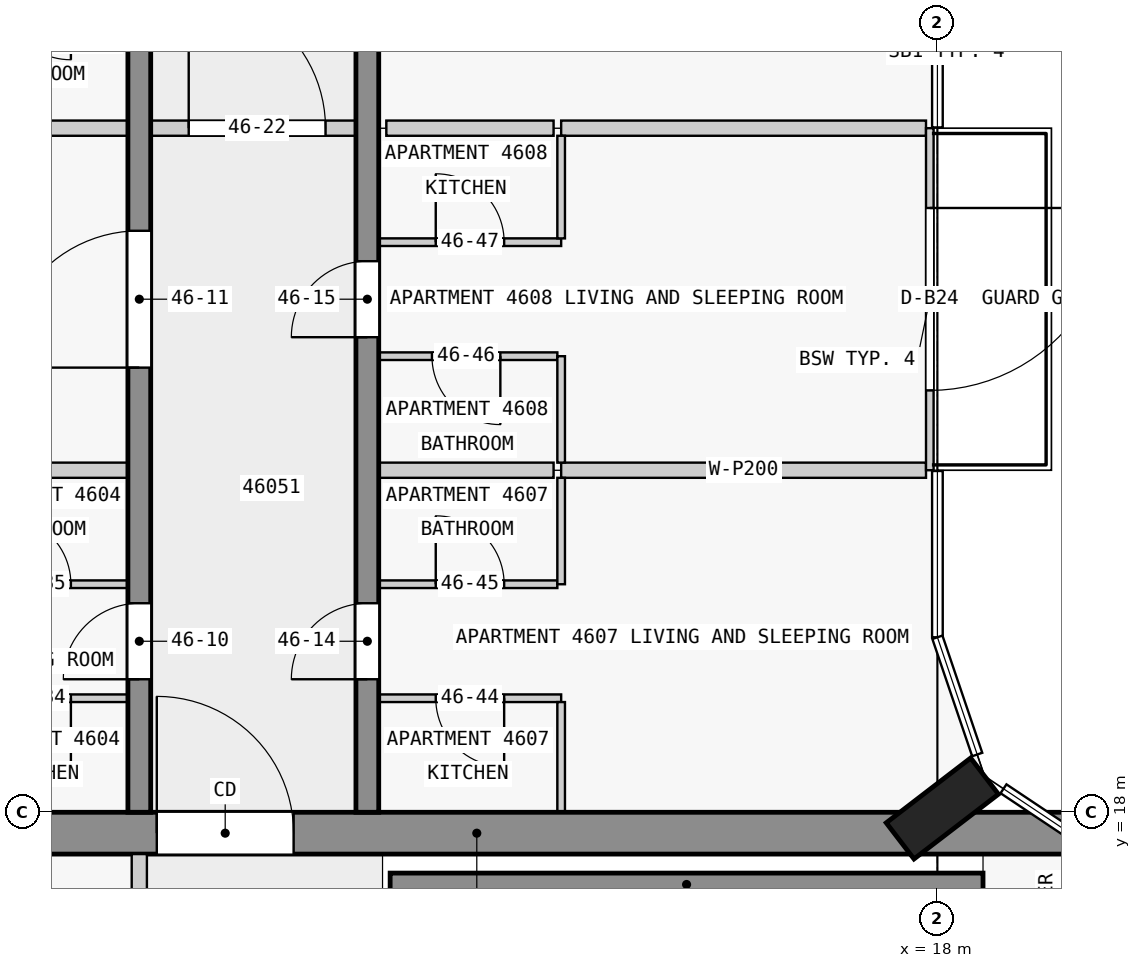
"""IFC4 building model, lengths in metres.
Left out: names, types, materials, properties, quantities, classifications, styles, units other than length and angle.
Written with IfcOpenShell. Run it as: python <this file> out.ifc"""

import sys

from ifc_helpers import new_model, si_unit, direction, frame, frame_2d, origin, origin_2d, place, context, subcontext, project, spatial, rectangle, extrude, element, fill, save


model = new_model("IFC4")
c1 = context("Model", 3, precision=1e-05, world=origin(), true_north=direction((0.0, 1.0)))
c2 = subcontext(c1, "Body", "Model", "MODEL_VIEW")
j1 = project(units=[si_unit("LENGTHUNIT", "METRE"), si_unit("PLANEANGLEUNIT", "RADIAN")], contexts=[c1])
p1 = place(None, origin())
s1 = spatial("IfcSite", under=j1, at=p1, CompositionType="ELEMENT")
p2 = place(p1, origin())
s2 = spatial("IfcBuilding", under=s1, at=p2, CompositionType="ELEMENT")
p3 = place(p2, frame((0.0, 0.0, 177.9)))
s3 = spatial("IfcBuildingStorey", under=s2, at=p3, CompositionType="ELEMENT", Elevation=177.9)
p4 = place(p3, frame((18.065, 18.05, 0.0), z_axis=(0.0, 0.0, 1.0), x_axis=(-0.608810846443, 0.793315418515, 0.0)))
e1 = element("IfcColumn", 1, at=p4, inside=s3, PredefinedType="COLUMN", context=c2, shape_type="SweptSolid", body=[
    extrude(rectangle(XDim=0.6, YDim=1.4, at=origin_2d()), origin(), (0.0, 0.0, 1.0), 3.5),
])
p5 = place(p3, frame((1.38, 17.725, 0.0), z_axis=(0.0, 0.0, 1.0), x_axis=(1.0, 0.0, 0.0)))
e2 = element("IfcWall", 2, at=p5, inside=s3, PredefinedType="SHEAR", context=c2, shape_type="SweptSolid", body=[
    extrude(rectangle(XDim=21.12, YDim=0.55, at=frame_2d((10.56, 0.0))), origin(), (0.0, 0.0, 1.0), 3.25),
])
p6 = place(p5, frame((6.35, 0.0, 0.0)))
e3 = element("IfcOpeningElement", 3, at=p6, cuts=e2, PredefinedType="OPENING", context=c2, shape_type="SweptSolid", body=[
    extrude(rectangle(XDim=1.8, YDim=2.1, at=frame_2d((0.9, 1.05))), frame((0.0, 0.285, 0.0), z_axis=(0.0, -1.0, 0.0), x_axis=(1.0, 0.0, 0.0)), (0.0, 0.0, 1.0), 0.57),
])
p7 = place(p3, frame((10.8, 17.05, 0.0), z_axis=(0.0, 0.0, 1.0), x_axis=(1.0, 0.0, 0.0)))
e4 = element("IfcWall", 4, at=p7, inside=s3, PredefinedType="SHEAR", context=c2, shape_type="SweptSolid", body=[
    extrude(rectangle(XDim=7.8, YDim=0.3, at=frame_2d((3.9, 0.0))), origin(), (0.0, 0.0, 1.0), 3.25),
])
p8 = place(p3, frame((7.5, 18.0, 0.0), z_axis=(0.0, 0.0, 1.0), x_axis=(0.0, 1.0, 0.0)))
e5 = element("IfcWall", 5, at=p8, inside=s3, PredefinedType="SHEAR", context=c2, shape_type="SweptSolid", body=[
    extrude(rectangle(XDim=27.0, YDim=0.3, at=frame_2d((13.5, 0.0))), origin(), (0.0, 0.0, 1.0), 3.25),
])
p9 = place(p8, frame((1.75, 0.0, 0.0)))
e6 = element("IfcOpeningElement", 6, at=p9, cuts=e5, PredefinedType="OPENING", context=c2, shape_type="SweptSolid", body=[
    extrude(rectangle(XDim=1.0, YDim=2.1, at=frame_2d((0.5, 1.05))), frame((0.0, 0.16, 0.0), z_axis=(0.0, -1.0, 0.0), x_axis=(1.0, 0.0, 0.0)), (0.0, 0.0, 1.0), 0.32),
])
p10 = place(p8, frame((5.85, 0.0, 0.0)))
e7 = element("IfcOpeningElement", 7, at=p10, cuts=e5, PredefinedType="OPENING", context=c2, shape_type="SweptSolid", body=[
    extrude(rectangle(XDim=1.8, YDim=2.1, at=frame_2d((0.9, 1.05))), frame((0.0, 0.16, 0.0), z_axis=(0.0, -1.0, 0.0), x_axis=(1.0, 0.0, 0.0)), (0.0, 0.0, 1.0), 0.32),
])
p11 = place(p8, frame((13.05, 0.0, 0.0)))
e8 = element("IfcOpeningElement", 8, at=p11, cuts=e5, PredefinedType="OPENING", context=c2, shape_type="SweptSolid", body=[
    extrude(rectangle(XDim=1.0, YDim=2.1, at=frame_2d((0.5, 1.05))), frame((0.0, 0.16, 0.0), z_axis=(0.0, -1.0, 0.0), x_axis=(1.0, 0.0, 0.0)), (0.0, 0.0, 1.0), 0.32),
])
p12 = place(p8, frame((21.35, 0.0, 0.0)))
e9 = element("IfcOpeningElement", 9, at=p12, cuts=e5, PredefinedType="OPENING", context=c2, shape_type="SweptSolid", body=[
    extrude(rectangle(XDim=1.0, YDim=2.1, at=frame_2d((0.5, 1.05))), frame((0.0, 0.16, 0.0), z_axis=(0.0, -1.0, 0.0), x_axis=(1.0, 0.0, 0.0)), (0.0, 0.0, 1.0), 0.32),
])
p13 = place(p3, frame((10.5, 18.0, 0.0), z_axis=(0.0, 0.0, 1.0), x_axis=(0.0, 1.0, 0.0)))
e10 = element("IfcWall", 10, at=p13, inside=s3, PredefinedType="SHEAR", context=c2, shape_type="SweptSolid", body=[
    extrude(rectangle(XDim=27.0, YDim=0.3, at=frame_2d((13.5, 0.0))), origin(), (0.0, 0.0, 1.0), 3.25),
])
p14 = place(p13, frame((1.75, 0.0, 0.0)))
e11 = element("IfcOpeningElement", 11, at=p14, cuts=e10, PredefinedType="OPENING", context=c2, shape_type="SweptSolid", body=[
    extrude(rectangle(XDim=1.0, YDim=2.1, at=frame_2d((0.5, 1.05))), frame((0.0, 0.16, 0.0), z_axis=(0.0, -1.0, 0.0), x_axis=(1.0, 0.0, 0.0)), (0.0, 0.0, 1.0), 0.32),
])
p15 = place(p13, frame((6.25, 0.0, 0.0)))
e12 = element("IfcOpeningElement", 12, at=p15, cuts=e10, PredefinedType="OPENING", context=c2, shape_type="SweptSolid", body=[
    extrude(rectangle(XDim=1.0, YDim=2.1, at=frame_2d((0.5, 1.05))), frame((0.0, 0.16, 0.0), z_axis=(0.0, -1.0, 0.0), x_axis=(1.0, 0.0, 0.0)), (0.0, 0.0, 1.0), 0.32),
])
p16 = place(p13, frame((10.75, 0.0, 0.0)))
e13 = element("IfcOpeningElement", 13, at=p16, cuts=e10, PredefinedType="OPENING", context=c2, shape_type="SweptSolid", body=[
    extrude(rectangle(XDim=1.0, YDim=2.1, at=frame_2d((0.5, 1.05))), frame((0.0, 0.16, 0.0), z_axis=(0.0, -1.0, 0.0), x_axis=(1.0, 0.0, 0.0)), (0.0, 0.0, 1.0), 0.32),
])
p17 = place(p13, frame((15.25, 0.0, 0.0)))
e14 = element("IfcOpeningElement", 14, at=p17, cuts=e10, PredefinedType="OPENING", context=c2, shape_type="SweptSolid", body=[
    extrude(rectangle(XDim=1.0, YDim=2.1, at=frame_2d((0.5, 1.05))), frame((0.0, 0.16, 0.0), z_axis=(0.0, -1.0, 0.0), x_axis=(1.0, 0.0, 0.0)), (0.0, 0.0, 1.0), 0.32),
])
p18 = place(p13, frame((19.75, 0.0, 0.0)))
e15 = element("IfcOpeningElement", 15, at=p18, cuts=e10, PredefinedType="OPENING", context=c2, shape_type="SweptSolid", body=[
    extrude(rectangle(XDim=1.0, YDim=2.1, at=frame_2d((0.5, 1.05))), frame((0.0, 0.16, 0.0), z_axis=(0.0, -1.0, 0.0), x_axis=(1.0, 0.0, 0.0)), (0.0, 0.0, 1.0), 0.32),
])
p19 = place(p13, frame((23.25, 0.0, 0.0)))
e16 = element("IfcOpeningElement", 16, at=p19, cuts=e10, PredefinedType="OPENING", context=c2, shape_type="SweptSolid", body=[
    extrude(rectangle(XDim=0.9, YDim=2.1, at=frame_2d((0.45, 1.05))), frame((0.0, 0.16, 0.0), z_axis=(0.0, -1.0, 0.0), x_axis=(1.0, 0.0, 0.0)), (0.0, 0.0, 1.0), 0.32),
])
p20 = place(p13, frame((25.45, 0.0, 0.0)))
e17 = element("IfcOpeningElement", 17, at=p20, cuts=e10, PredefinedType="OPENING", context=c2, shape_type="SweptSolid", body=[
    extrude(rectangle(XDim=1.0, YDim=2.1, at=frame_2d((0.5, 1.05))), frame((0.0, 0.16, 0.0), z_axis=(0.0, -1.0, 0.0), x_axis=(1.0, 0.0, 0.0)), (0.0, 0.0, 1.0), 0.32),
])
p21 = place(p3, frame((17.9, 27.0, 0.0), z_axis=(0.0, 0.0, 1.0), x_axis=(0.0, -1.0, 0.0)))
e18 = element("IfcWall", 18, at=p21, inside=s3, PredefinedType="STANDARD", context=c2, shape_type="SweptSolid", body=[
    extrude(rectangle(XDim=4.5, YDim=0.1, at=frame_2d((2.25, 0.0))), origin(), (0.0, 0.0, 1.0), 3.25),
])
p22 = place(p21, frame((1.05, 0.0, 0.0)))
e19 = element("IfcOpeningElement", 19, at=p22, cuts=e18, PredefinedType="OPENING", context=c2, shape_type="SweptSolid", body=[
    extrude(rectangle(XDim=2.4, YDim=2.4, at=frame_2d((1.2, 1.2))), frame((0.0, 0.06, 0.0), z_axis=(0.0, -1.0, 0.0), x_axis=(1.0, 0.0, 0.0)), (0.0, 0.0, 1.0), 0.12),
])
p23 = place(p3, frame((7.5, 10.1, 0.0), z_axis=(0.0, 0.0, 1.0), x_axis=(0.0, 1.0, 0.0)))
e20 = element("IfcWall", 20, at=p23, inside=s3, PredefinedType="PARTITIONING", context=c2, shape_type="SweptSolid", body=[
    extrude(rectangle(XDim=7.35, YDim=0.2, at=frame_2d((3.675, 0.0))), origin(), (0.0, 0.0, 1.0), 3.25),
])
p24 = place(p23, frame((0.775, 0.0, 0.0)))
e21 = element("IfcOpeningElement", 21, at=p24, cuts=e20, PredefinedType="OPENING", context=c2, shape_type="SweptSolid", body=[
    extrude(rectangle(XDim=0.9, YDim=2.1, at=frame_2d((0.45, 1.05))), frame((0.0, 0.11, 0.0), z_axis=(0.0, -1.0, 0.0), x_axis=(1.0, 0.0, 0.0)), (0.0, 0.0, 1.0), 0.22),
])
p25 = place(p23, frame((3.225, 0.0, 0.0)))
e22 = element("IfcOpeningElement", 22, at=p25, cuts=e20, PredefinedType="OPENING", context=c2, shape_type="SweptSolid", body=[
    extrude(rectangle(XDim=0.9, YDim=2.1, at=frame_2d((0.45, 1.05))), frame((0.0, 0.11, 0.0), z_axis=(0.0, -1.0, 0.0), x_axis=(1.0, 0.0, 0.0)), (0.0, 0.0, 1.0), 0.22),
])
p26 = place(p23, frame((5.25, 0.0, 0.0)))
e23 = element("IfcOpeningElement", 23, at=p26, cuts=e20, PredefinedType="OPENING", context=c2, shape_type="SweptSolid", body=[
    extrude(rectangle(XDim=0.9, YDim=2.1, at=frame_2d((0.45, 1.05))), frame((0.0, 0.11, 0.0), z_axis=(0.0, -1.0, 0.0), x_axis=(1.0, 0.0, 0.0)), (0.0, 0.0, 1.0), 0.22),
])
p27 = place(p3, frame((7.35, 19.5, 0.0), z_axis=(0.0, 0.0, 1.0), x_axis=(-1.0, 0.0, 0.0)))
e24 = element("IfcWall", 24, at=p27, inside=s3, PredefinedType="PARTITIONING", context=c2, shape_type="SweptSolid", body=[
    extrude(rectangle(XDim=2.4, YDim=0.1, at=frame_2d((1.2, 0.0))), origin(), (0.0, 0.0, 1.0), 3.25),
])
p28 = place(p27, frame((0.75, 0.0, 0.0)))
e25 = element("IfcOpeningElement", 25, at=p28, cuts=e24, PredefinedType="OPENING", context=c2, shape_type="SweptSolid", body=[
    extrude(rectangle(XDim=0.9, YDim=2.1, at=frame_2d((0.45, 1.05))), frame((0.0, 0.06, 0.0), z_axis=(0.0, -1.0, 0.0), x_axis=(1.0, 0.0, 0.0)), (0.0, 0.0, 1.0), 0.12),
])
p29 = place(p3, frame((13.05, 19.5, 0.0), z_axis=(0.0, 0.0, 1.0), x_axis=(-1.0, 0.0, 0.0)))
e26 = element("IfcWall", 26, at=p29, inside=s3, PredefinedType="PARTITIONING", context=c2, shape_type="SweptSolid", body=[
    extrude(rectangle(XDim=2.4, YDim=0.1, at=frame_2d((1.2, 0.0))), origin(), (0.0, 0.0, 1.0), 3.25),
])
p30 = place(p29, frame((0.75, 0.0, 0.0)))
e27 = element("IfcOpeningElement", 27, at=p30, cuts=e26, PredefinedType="OPENING", context=c2, shape_type="SweptSolid", body=[
    extrude(rectangle(XDim=0.9, YDim=2.1, at=frame_2d((0.45, 1.05))), frame((0.0, 0.06, 0.0), z_axis=(0.0, -1.0, 0.0), x_axis=(1.0, 0.0, 0.0)), (0.0, 0.0, 1.0), 0.12),
])
p31 = place(p3, frame((4.95, 21.0, 0.0), z_axis=(0.0, 0.0, 1.0), x_axis=(1.0, 0.0, 0.0)))
e28 = element("IfcWall", 28, at=p31, inside=s3, PredefinedType="PARTITIONING", context=c2, shape_type="SweptSolid", body=[
    extrude(rectangle(XDim=2.4, YDim=0.1, at=frame_2d((1.2, 0.0))), origin(), (0.0, 0.0, 1.0), 3.25),
])
p32 = place(p31, frame((0.75, 0.0, 0.0)))
e29 = element("IfcOpeningElement", 29, at=p32, cuts=e28, PredefinedType="OPENING", context=c2, shape_type="SweptSolid", body=[
    extrude(rectangle(XDim=0.9, YDim=2.1, at=frame_2d((0.45, 1.05))), frame((0.0, 0.06, 0.0), z_axis=(0.0, -1.0, 0.0), x_axis=(1.0, 0.0, 0.0)), (0.0, 0.0, 1.0), 0.12),
])
p33 = place(p3, frame((10.65, 21.0, 0.0), z_axis=(0.0, 0.0, 1.0), x_axis=(1.0, 0.0, 0.0)))
e30 = element("IfcWall", 30, at=p33, inside=s3, PredefinedType="PARTITIONING", context=c2, shape_type="SweptSolid", body=[
    extrude(rectangle(XDim=2.35, YDim=0.1, at=frame_2d((1.175, 0.0))), origin(), (0.0, 0.0, 1.0), 3.25),
])
p34 = place(p33, frame((0.75, 0.0, 0.0)))
e31 = element("IfcOpeningElement", 31, at=p34, cuts=e30, PredefinedType="OPENING", context=c2, shape_type="SweptSolid", body=[
    extrude(rectangle(XDim=0.9, YDim=2.1, at=frame_2d((0.45, 1.05))), frame((0.0, 0.06, 0.0), z_axis=(0.0, -1.0, 0.0), x_axis=(1.0, 0.0, 0.0)), (0.0, 0.0, 1.0), 0.12),
])
for number, where, z_axis, x_axis in (
    (32, (7.35, 22.5, 0.0), (0.0, 0.0, 1.0), (-1.0, 0.0, 0.0)),
    (33, (12.95, 22.5, 0.0), (0.0, 0.0, 1.0), (-1.0, 0.0, 0.0)),
):
    element("IfcWall", number, at=place(p3, frame(where, z_axis=z_axis, x_axis=x_axis)), inside=s3, PredefinedType="PARTITIONING", context=c2, shape_type="SweptSolid", body=[
        extrude(rectangle(XDim=2.3, YDim=0.2, at=frame_2d((1.15, 0.0))), origin(), (0.0, 0.0, 1.0), 3.25),
    ])
p35 = place(p3, frame((13.05, 22.5, 0.0), z_axis=(0.0, 0.0, 1.0), x_axis=(1.0, 0.0, 0.0)))
e34 = element("IfcWall", 34, at=p35, inside=s3, PredefinedType="PARTITIONING", context=c2, shape_type="SweptSolid", body=[
    extrude(rectangle(XDim=4.8, YDim=0.2, at=frame_2d((2.4, 0.0))), origin(), (0.0, 0.0, 1.0), 3.25),
])
p36 = place(p3, frame((13.0, 24.0, 0.0), z_axis=(0.0, 0.0, 1.0), x_axis=(-1.0, 0.0, 0.0)))
e35 = element("IfcWall", 35, at=p36, inside=s3, PredefinedType="PARTITIONING", context=c2, shape_type="SweptSolid", body=[
    extrude(rectangle(XDim=2.35, YDim=0.1, at=frame_2d((1.175, 0.0))), origin(), (0.0, 0.0, 1.0), 3.25),
])
p37 = place(p36, frame((0.75, 0.0, 0.0)))
e36 = element("IfcOpeningElement", 36, at=p37, cuts=e35, PredefinedType="OPENING", context=c2, shape_type="SweptSolid", body=[
    extrude(rectangle(XDim=0.9, YDim=2.1, at=frame_2d((0.45, 1.05))), frame((0.0, 0.06, 0.0), z_axis=(0.0, -1.0, 0.0), x_axis=(1.0, 0.0, 0.0)), (0.0, 0.0, 1.0), 0.12),
])
p38 = place(p3, frame((10.65, 25.5, 0.0), z_axis=(0.0, 0.0, 1.0), x_axis=(1.0, 0.0, 0.0)))
e37 = element("IfcWall", 37, at=p38, inside=s3, PredefinedType="PARTITIONING", context=c2, shape_type="SweptSolid", body=[
    extrude(rectangle(XDim=2.4, YDim=0.1, at=frame_2d((1.2, 0.0))), origin(), (0.0, 0.0, 1.0), 3.25),
])
p39 = place(p38, frame((0.75, 0.0, 0.0)))
e38 = element("IfcOpeningElement", 38, at=p39, cuts=e37, PredefinedType="OPENING", context=c2, shape_type="SweptSolid", body=[
    extrude(rectangle(XDim=0.9, YDim=2.1, at=frame_2d((0.45, 1.05))), frame((0.0, 0.06, 0.0), z_axis=(0.0, -1.0, 0.0), x_axis=(1.0, 0.0, 0.0)), (0.0, 0.0, 1.0), 0.12),
])
p40 = place(p3, frame((7.35, 27.0, 0.0), z_axis=(0.0, 0.0, 1.0), x_axis=(-1.0, 0.0, 0.0)))
e39 = element("IfcWall", 39, at=p40, inside=s3, PredefinedType="PARTITIONING", context=c2, shape_type="SweptSolid", body=[
    extrude(rectangle(XDim=7.43, YDim=0.2, at=frame_2d((3.715, 0.0))), origin(), (0.0, 0.0, 1.0), 3.25),
])
p41 = place(p3, frame((12.95, 27.0, 0.0), z_axis=(0.0, 0.0, 1.0), x_axis=(-1.0, 0.0, 0.0)))
e40 = element("IfcWall", 40, at=p41, inside=s3, PredefinedType="PARTITIONING", context=c2, shape_type="SweptSolid", body=[
    extrude(rectangle(XDim=2.2, YDim=0.2, at=frame_2d((1.1, 0.0))), origin(), (0.0, 0.0, 1.0), 3.25),
])
p42 = place(p3, frame((13.05, 27.0, 0.0), z_axis=(0.0, 0.0, 1.0), x_axis=(1.0, 0.0, 0.0)))
e41 = element("IfcWall", 41, at=p42, inside=s3, PredefinedType="PARTITIONING", context=c2, shape_type="SweptSolid", body=[
    extrude(rectangle(XDim=4.8, YDim=0.2, at=frame_2d((2.4, 0.0))), origin(), (0.0, 0.0, 1.0), 3.25),
])
p43 = place(p3, frame((13.05, 18.0, 0.0), z_axis=(0.0, 0.0, 1.0), x_axis=(0.0, 1.0, 0.0)))
e42 = element("IfcWall", 42, at=p43, inside=s3, PredefinedType="PARTITIONING", context=c2, shape_type="SweptSolid", body=[
    extrude(rectangle(XDim=1.45, YDim=0.1, at=frame_2d((0.725, 0.0))), origin(), (0.0, 0.0, 1.0), 3.25),
])
for number, where, z_axis, x_axis in (
    (43, (13.05, 21.0, 0.0), (0.0, 0.0, 1.0), (0.0, 1.0, 0.0)),
    (44, (13.05, 22.6, 0.0), (0.0, 0.0, 1.0), (0.0, 1.0, 0.0)),
):
    element("IfcWall", number, at=place(p3, frame(where, z_axis=z_axis, x_axis=x_axis)), inside=s3, PredefinedType="PARTITIONING", context=c2, shape_type="SweptSolid", body=[
        extrude(rectangle(XDim=1.4, YDim=0.1, at=frame_2d((0.7, 0.0))), origin(), (0.0, 0.0, 1.0), 3.25),
    ])
p44 = place(p3, frame((13.05, 25.55, 0.0), z_axis=(0.0, 0.0, 1.0), x_axis=(0.0, 1.0, 0.0)))
e45 = element("IfcWall", 45, at=p44, inside=s3, PredefinedType="PARTITIONING", context=c2, shape_type="SweptSolid", body=[
    extrude(rectangle(XDim=1.35, YDim=0.1, at=frame_2d((0.675, 0.0))), origin(), (0.0, 0.0, 1.0), 3.25),
])
p45 = place(p3, frame((7.45, 27.0, 0.0), z_axis=(0.0, 0.0, 1.0), x_axis=(1.0, 0.0, 0.0)))
e46 = element("IfcWall", 46, at=p45, inside=s3, PredefinedType="PARTITIONING", context=c2, shape_type="SweptSolid", body=[
    extrude(rectangle(XDim=3.2, YDim=0.2, at=frame_2d((1.6, 0.0))), origin(), (0.0, 0.0, 1.0), 3.25),
])
p46 = place(p45, frame((0.7, 0.0, 0.0)))
e47 = element("IfcOpeningElement", 47, at=p46, cuts=e46, PredefinedType="OPENING", context=c2, shape_type="SweptSolid", body=[
    extrude(rectangle(XDim=1.8, YDim=2.1, at=frame_2d((0.9, 1.05))), frame((0.0, 0.11, 0.0), z_axis=(0.0, -1.0, 0.0), x_axis=(1.0, 0.0, 0.0)), (0.0, 0.0, 1.0), 0.22),
])
p47 = place(p22, origin())
e48 = element("IfcDoor", 48, at=p47, inside=s3, OperationType="SINGLE_SWING_LEFT", PredefinedType="DOOR", context=c2, shape_type="SweptSolid", body=[
    extrude(rectangle(XDim=2.4, YDim=2.4, at=frame_2d((1.2, 1.2))), frame((0.0, 0.025, 0.0), z_axis=(0.0, -1.0, 0.0), x_axis=(1.0, 0.0, 0.0)), (0.0, 0.0, 1.0), 0.05),
])
fill(e19, e48)
p48 = place(p6, origin())
e49 = element("IfcDoor", 49, at=p48, inside=s3, OperationType="DOUBLE_DOOR_SINGLE_SWING", PredefinedType="DOOR", context=c2, shape_type="SweptSolid", body=[
    extrude(rectangle(XDim=1.8, YDim=2.1, at=frame_2d((0.9, 1.05))), frame((0.0, 0.025, 0.0), z_axis=(0.0, -1.0, 0.0), x_axis=(1.0, 0.0, 0.0)), (0.0, 0.0, 1.0), 0.05),
])
fill(e3, e49)
p49 = place(p9, origin())
e50 = element("IfcDoor", 50, at=p49, inside=s3, OperationType="SINGLE_SWING_LEFT", PredefinedType="DOOR", context=c2, shape_type="SweptSolid", body=[
    extrude(rectangle(XDim=1.0, YDim=2.1, at=frame_2d((0.5, 1.05))), frame((0.0, 0.025, 0.0), z_axis=(0.0, -1.0, 0.0), x_axis=(1.0, 0.0, 0.0)), (0.0, 0.0, 1.0), 0.05),
])
fill(e6, e50)
p50 = place(p10, origin())
e51 = element("IfcDoor", 51, at=p50, inside=s3, OperationType="SINGLE_SWING_LEFT", PredefinedType="DOOR", context=c2, shape_type="SweptSolid", body=[
    extrude(rectangle(XDim=1.8, YDim=2.1, at=frame_2d((0.9, 1.05))), frame((0.0, 0.025, 0.0), z_axis=(0.0, -1.0, 0.0), x_axis=(1.0, 0.0, 0.0)), (0.0, 0.0, 1.0), 0.05),
])
fill(e7, e51)
p51 = place(p14, origin())
e52 = element("IfcDoor", 52, at=p51, inside=s3, OperationType="SINGLE_SWING_LEFT", PredefinedType="DOOR", context=c2, shape_type="SweptSolid", body=[
    extrude(rectangle(XDim=1.0, YDim=2.1, at=frame_2d((0.5, 1.05))), frame((0.0, 0.025, 0.0), z_axis=(0.0, -1.0, 0.0), x_axis=(1.0, 0.0, 0.0)), (0.0, 0.0, 1.0), 0.05),
])
fill(e11, e52)
p52 = place(p15, origin())
e53 = element("IfcDoor", 53, at=p52, inside=s3, OperationType="SINGLE_SWING_LEFT", PredefinedType="DOOR", context=c2, shape_type="SweptSolid", body=[
    extrude(rectangle(XDim=1.0, YDim=2.1, at=frame_2d((0.5, 1.05))), frame((0.0, 0.025, 0.0), z_axis=(0.0, -1.0, 0.0), x_axis=(1.0, 0.0, 0.0)), (0.0, 0.0, 1.0), 0.05),
])
fill(e12, e53)
p53 = place(p46, origin())
e54 = element("IfcDoor", 54, at=p53, inside=s3, OperationType="SINGLE_SWING_LEFT", PredefinedType="DOOR", context=c2, shape_type="SweptSolid", body=[
    extrude(rectangle(XDim=1.8, YDim=2.1, at=frame_2d((0.9, 1.05))), frame((0.0, 0.025, 0.0), z_axis=(0.0, -1.0, 0.0), x_axis=(1.0, 0.0, 0.0)), (0.0, 0.0, 1.0), 0.05),
])
fill(e47, e54)
p54 = place(p28, origin())
e55 = element("IfcDoor", 55, at=p54, inside=s3, OperationType="SINGLE_SWING_RIGHT", PredefinedType="DOOR", context=c2, shape_type="SweptSolid", body=[
    extrude(rectangle(XDim=0.9, YDim=2.1, at=frame_2d((0.45, 1.05))), frame((0.0, 0.025, 0.0), z_axis=(0.0, -1.0, 0.0), x_axis=(1.0, 0.0, 0.0)), (0.0, 0.0, 1.0), 0.05),
])
fill(e25, e55)
p55 = place(p32, origin())
e56 = element("IfcDoor", 56, at=p55, inside=s3, OperationType="SINGLE_SWING_RIGHT", PredefinedType="DOOR", context=c2, shape_type="SweptSolid", body=[
    extrude(rectangle(XDim=0.9, YDim=2.1, at=frame_2d((0.45, 1.05))), frame((0.0, 0.025, 0.0), z_axis=(0.0, -1.0, 0.0), x_axis=(1.0, 0.0, 0.0)), (0.0, 0.0, 1.0), 0.05),
])
fill(e29, e56)
p56 = place(p30, origin())
e57 = element("IfcDoor", 57, at=p56, inside=s3, OperationType="SINGLE_SWING_LEFT", PredefinedType="DOOR", context=c2, shape_type="SweptSolid", body=[
    extrude(rectangle(XDim=0.9, YDim=2.1, at=frame_2d((0.45, 1.05))), frame((0.0, 0.025, 0.0), z_axis=(0.0, -1.0, 0.0), x_axis=(1.0, 0.0, 0.0)), (0.0, 0.0, 1.0), 0.05),
])
fill(e27, e57)
p57 = place(p34, origin())
e58 = element("IfcDoor", 58, at=p57, inside=s3, OperationType="SINGLE_SWING_RIGHT", PredefinedType="DOOR", context=c2, shape_type="SweptSolid", body=[
    extrude(rectangle(XDim=0.9, YDim=2.1, at=frame_2d((0.45, 1.05))), frame((0.0, 0.025, 0.0), z_axis=(0.0, -1.0, 0.0), x_axis=(1.0, 0.0, 0.0)), (0.0, 0.0, 1.0), 0.05),
])
fill(e31, e58)
p58 = place(p37, origin())
e59 = element("IfcDoor", 59, at=p58, inside=s3, OperationType="SINGLE_SWING_RIGHT", PredefinedType="DOOR", context=c2, shape_type="SweptSolid", body=[
    extrude(rectangle(XDim=0.9, YDim=2.1, at=frame_2d((0.45, 1.05))), frame((0.0, 0.025, 0.0), z_axis=(0.0, -1.0, 0.0), x_axis=(1.0, 0.0, 0.0)), (0.0, 0.0, 1.0), 0.05),
])
fill(e36, e59)
p59 = place(p39, origin())
e60 = element("IfcDoor", 60, at=p59, inside=s3, OperationType="SINGLE_SWING_LEFT", PredefinedType="DOOR", context=c2, shape_type="SweptSolid", body=[
    extrude(rectangle(XDim=0.9, YDim=2.1, at=frame_2d((0.45, 1.05))), frame((0.0, 0.025, 0.0), z_axis=(0.0, -1.0, 0.0), x_axis=(1.0, 0.0, 0.0)), (0.0, 0.0, 1.0), 0.05),
])
fill(e38, e60)
save(model, sys.argv[1])
